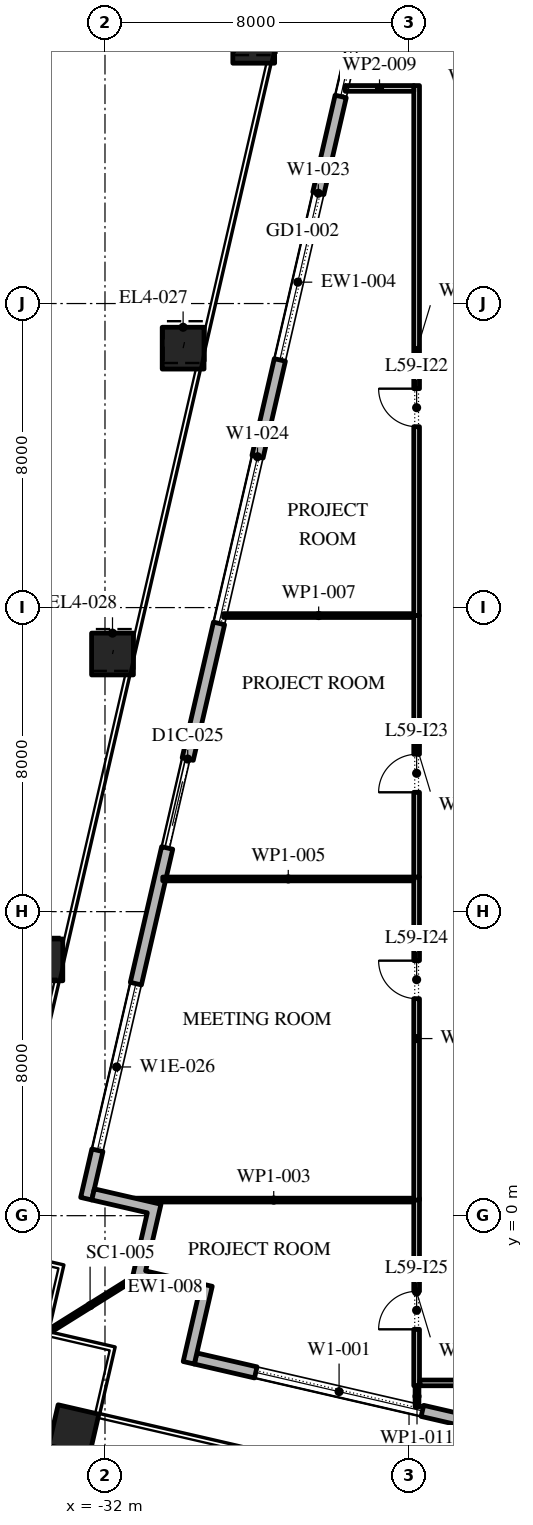
"""IFC4 building model, lengths in metres.
Left out: names, types, materials, properties, quantities, classifications, styles, units other than length and angle.
Written with IfcOpenShell. Run it as: python <this file> out.ifc"""

import sys

from ifc_helpers import new_model, si_unit, direction, frame, frame_2d, origin, origin_2d, place, context, subcontext, project, spatial, polyline, rectangle, outline, extrude, element, fill, save


model = new_model("IFC4")
c1 = context("Model", 3, precision=1e-05, world=origin(), true_north=direction((0.0, 1.0)))
c2 = subcontext(c1, "Body", "Model", "MODEL_VIEW")
j1 = project(units=[si_unit("LENGTHUNIT", "METRE"), si_unit("PLANEANGLEUNIT", "RADIAN")], contexts=[c1])
p1 = place(None, origin())
s1 = spatial("IfcSite", under=j1, at=p1, CompositionType="ELEMENT")
p2 = place(p1, origin())
s2 = spatial("IfcBuilding", under=s1, at=p2, CompositionType="ELEMENT")
p3 = place(p2, frame((0.0, 0.0, 272.4)))
s3 = spatial("IfcBuildingStorey", under=s2, at=p3, CompositionType="ELEMENT", Elevation=272.4)
p4 = place(p3, frame((-32.821, -5.635, 0.0), z_axis=(0.0, 0.0, 1.0), x_axis=(0.974370064785, -0.224951054344, 0.0)))
e1 = element("IfcColumn", 1, at=p4, inside=s3, PredefinedType="COLUMN", context=c2, shape_type="SweptSolid", body=[
    extrude(rectangle(XDim=1.1, YDim=1.1, at=origin_2d()), origin(), (0.0, 0.0, 1.0), 4.2),
])
p5 = place(p3, frame((-28.086, 30.874, 0.0), z_axis=(0.011667590749, 0.050559559912, 0.998652891764), x_axis=(-0.974391195695, 0.224859506699, 0.0)))
e2 = element("IfcColumn", 2, at=p5, inside=s3, PredefinedType="COLUMN", context=c2, shape_type="SweptSolid", body=[
    extrude(rectangle(XDim=1.1, YDim=1.1, at=origin_2d()), origin(), (0.0, 0.0, 1.0), 4.206),
])
p6 = place(p3, frame((-29.944, 22.826, 0.0), z_axis=(0.008770375651, 0.037927518544, 0.999242004646), x_axis=(-0.974290512438, 0.225295355862, 0.0)))
e3 = element("IfcColumn", 3, at=p6, inside=s3, PredefinedType="COLUMN", context=c2, shape_type="SweptSolid", body=[
    extrude(rectangle(XDim=1.1, YDim=1.1, at=origin_2d()), origin(), (0.0, 0.0, 1.0), 4.203),
])
p7 = place(p3, frame((-31.802, 14.778, 0.0), z_axis=(0.005810637908, 0.02533438128, 0.999662145733), x_axis=(-0.974691740237, 0.22355315143, 0.0)))
e4 = element("IfcColumn", 4, at=p7, inside=s3, PredefinedType="COLUMN", context=c2, shape_type="SweptSolid", body=[
    extrude(rectangle(XDim=1.1, YDim=1.1, at=origin_2d()), origin(), (0.0, 0.0, 1.0), 4.202),
])
p8 = place(p3, frame((-33.66, 6.73, 0.0), z_axis=(0.00290605529, 0.012670401066, 0.99991550432), x_axis=(-0.974691740237, 0.22355315143, 0.0)))
e5 = element("IfcColumn", 5, at=p8, inside=s3, PredefinedType="COLUMN", context=c2, shape_type="SweptSolid", body=[
    extrude(rectangle(XDim=1.1, YDim=1.1, at=origin_2d()), origin(), (0.0, 0.0, 1.0), 4.2),
])
p9 = place(p3, frame((-29.616, -3.758, 0.0), z_axis=(0.0, 0.0, 1.0), x_axis=(0.974370532314, -0.224949029246, 0.0)))
e6 = element("IfcWall", 6, at=p9, inside=s3, PredefinedType="STANDARD", context=c2, shape_type="SweptSolid", body=[
    extrude(rectangle(XDim=48.0, YDim=0.3, at=frame_2d((24.0, 0.0))), origin(), (0.0, 0.0, 1.0), 4.0),
])
p10 = place(p9, frame((1.625, 0.0, 0.45)))
e7 = element("IfcOpeningElement", 7, at=p10, cuts=e6, PredefinedType="OPENING", context=c2, shape_type="SweptSolid", body=[
    extrude(rectangle(XDim=4.5, YDim=3.05, at=frame_2d((2.25, 1.525))), frame((0.0, 0.16, 0.0), z_axis=(0.0, -1.0, 0.0), x_axis=(1.0, 0.0, 0.0)), (0.0, 0.0, 1.0), 0.32),
])
p11 = place(p9, frame((10.575, 0.0, 0.0)))
e8 = element("IfcOpeningElement", 8, at=p11, cuts=e6, PredefinedType="OPENING", context=c2, shape_type="SweptSolid", body=[
    extrude(rectangle(XDim=2.4, YDim=3.5, at=frame_2d((1.2, 1.75))), frame((0.0, 0.16, 0.0), z_axis=(0.0, -1.0, 0.0), x_axis=(1.0, 0.0, 0.0)), (0.0, 0.0, 1.0), 0.32),
])
p12 = place(p9, frame((17.575, 0.0, 0.45)))
e9 = element("IfcOpeningElement", 9, at=p12, cuts=e6, PredefinedType="OPENING", context=c2, shape_type="SweptSolid", body=[
    extrude(rectangle(XDim=4.5, YDim=3.0, at=frame_2d((2.25, 1.5))), frame((0.0, 0.16, 0.0), z_axis=(0.0, -1.0, 0.0), x_axis=(1.0, 0.0, 0.0)), (0.0, 0.0, 1.0), 0.32),
])
p13 = place(p9, frame((25.625, 0.0, 0.45)))
e10 = element("IfcOpeningElement", 10, at=p13, cuts=e6, PredefinedType="OPENING", context=c2, shape_type="SweptSolid", body=[
    extrude(rectangle(XDim=4.5, YDim=2.95, at=frame_2d((2.25, 1.475))), frame((0.0, 0.16, 0.0), z_axis=(0.0, -1.0, 0.0), x_axis=(1.0, 0.0, 0.0)), (0.0, 0.0, 1.0), 0.32),
])
p14 = place(p9, frame((33.675, 0.0, 0.45)))
e11 = element("IfcOpeningElement", 11, at=p14, cuts=e6, PredefinedType="OPENING", context=c2, shape_type="SweptSolid", body=[
    extrude(rectangle(XDim=4.5, YDim=2.825, at=frame_2d((2.25, 1.413))), frame((0.0, 0.16, 0.0), z_axis=(0.0, -1.0, 0.0), x_axis=(1.0, 0.0, 0.0)), (0.0, 0.0, 1.0), 0.32),
])
p15 = place(p9, frame((42.175, 0.0, 0.0)))
e12 = element("IfcOpeningElement", 12, at=p15, cuts=e6, PredefinedType="OPENING", context=c2, shape_type="SweptSolid", body=[
    extrude(rectangle(XDim=2.4, YDim=3.5, at=frame_2d((1.2, 1.75))), frame((0.0, 0.16, 0.0), z_axis=(0.0, -1.0, 0.0), x_axis=(1.0, 0.0, 0.0)), (0.0, 0.0, 1.0), 0.32),
])
p16 = place(p3, frame((-21.359, 48.678, 0.0), z_axis=(0.0, 0.0, 1.0), x_axis=(-0.224949198343, -0.974370493275, 0.0)))
e13 = element("IfcWall", 13, at=p16, inside=s3, PredefinedType="STANDARD", context=c2, shape_type="SweptSolid", body=[
    extrude(rectangle(XDim=49.5, YDim=0.3, at=frame_2d((24.75, 0.0))), origin(), (0.0, 0.0, 1.0), 4.0),
])
p17 = place(p16, frame((1.157, 0.0, 0.45)))
e14 = element("IfcOpeningElement", 14, at=p17, cuts=e13, PredefinedType="OPENING", context=c2, shape_type="SweptSolid", body=[
    extrude(rectangle(XDim=4.5, YDim=3.05, at=frame_2d((2.25, 1.525))), frame((0.0, 0.16, 0.0), z_axis=(0.0, -1.0, 0.0), x_axis=(1.0, 0.0, 0.0)), (0.0, 0.0, 1.0), 0.32),
])
p18 = place(p16, frame((9.171, 0.0, 0.0)))
e15 = element("IfcOpeningElement", 15, at=p18, cuts=e13, PredefinedType="OPENING", context=c2, shape_type="SweptSolid", body=[
    extrude(rectangle(XDim=2.4, YDim=3.5, at=frame_2d((1.2, 1.75))), frame((0.0, 0.16, 0.0), z_axis=(0.0, -1.0, 0.0), x_axis=(1.0, 0.0, 0.0)), (0.0, 0.0, 1.0), 0.32),
])
p19 = place(p16, frame((15.236, 0.0, 0.45)))
e16 = element("IfcOpeningElement", 16, at=p19, cuts=e13, PredefinedType="OPENING", context=c2, shape_type="SweptSolid", body=[
    extrude(rectangle(XDim=4.5, YDim=3.05, at=frame_2d((2.25, 1.525))), frame((0.0, 0.16, 0.0), z_axis=(0.0, -1.0, 0.0), x_axis=(1.0, 0.0, 0.0)), (0.0, 0.0, 1.0), 0.32),
])
p20 = place(p16, frame((22.35, 0.0, 0.45)))
e17 = element("IfcOpeningElement", 17, at=p20, cuts=e13, PredefinedType="OPENING", context=c2, shape_type="SweptSolid", body=[
    extrude(rectangle(XDim=4.5, YDim=3.05, at=frame_2d((2.25, 1.525))), frame((0.0, 0.16, 0.0), z_axis=(0.0, -1.0, 0.0), x_axis=(1.0, 0.0, 0.0)), (0.0, 0.0, 1.0), 0.32),
])
p21 = place(p16, frame((29.464, 0.0, 0.45)))
e18 = element("IfcOpeningElement", 18, at=p21, cuts=e13, PredefinedType="OPENING", context=c2, shape_type="SweptSolid", body=[
    extrude(rectangle(XDim=4.5, YDim=3.05, at=frame_2d((2.25, 1.525))), frame((0.0, 0.16, 0.0), z_axis=(0.0, -1.0, 0.0), x_axis=(1.0, 0.0, 0.0)), (0.0, 0.0, 1.0), 0.32),
])
p22 = place(p16, frame((37.628, 0.0, 0.0)))
e19 = element("IfcOpeningElement", 19, at=p22, cuts=e13, PredefinedType="OPENING", context=c2, shape_type="SweptSolid", body=[
    extrude(rectangle(XDim=2.4, YDim=3.325, at=frame_2d((1.2, 1.663))), frame((0.0, 0.16, 0.0), z_axis=(0.0, -1.0, 0.0), x_axis=(1.0, 0.0, 0.0)), (0.0, 0.0, 1.0), 0.32),
])
p23 = place(p16, frame((43.693, 0.0, 0.45)))
e20 = element("IfcOpeningElement", 20, at=p23, cuts=e13, PredefinedType="OPENING", context=c2, shape_type="SweptSolid", body=[
    extrude(rectangle(XDim=4.5, YDim=2.825, at=frame_2d((2.25, 1.413))), frame((0.0, 0.16, 0.0), z_axis=(0.0, -1.0, 0.0), x_axis=(1.0, 0.0, 0.0)), (0.0, 0.0, 1.0), 0.32),
])
p24 = place(p3, origin())
e21 = element("IfcWall", 21, at=p24, inside=s3, PredefinedType="STANDARD", context=c2, shape_type="SweptSolid", body=[
    extrude(outline(polyline([(-31.291, -1.678), (-30.886, 0.076), (-32.348, 0.413), (-32.28, 0.705), (-30.526, 0.301), (-30.931, -1.453), (-29.177, -1.858), (-29.65, -3.905), (-29.942, -3.837), (-29.537, -2.083), (-31.291, -1.678)])), origin(), (0.0, 0.0, 1.0), 4.0),
])
p25 = place(p3, frame((-31.291, -1.678, -0.05), z_axis=(0.0, 0.0, 1.0), x_axis=(-0.84807753525, -0.529872148923, 0.0)))
e22 = element("IfcWall", 22, at=p25, inside=s3, PredefinedType="STANDARD", context=c2, shape_type="SweptSolid", body=[
    extrude(rectangle(XDim=2.596, YDim=0.1, at=frame_2d((1.298, 0.0))), origin(), (0.0, 0.0, 1.0), 4.05),
])
p26 = place(p3, frame((-23.8, -4.475, 0.0), z_axis=(0.0, 0.0, 1.0), x_axis=(0.0, 1.0, 0.0)))
e23 = element("IfcWall", 23, at=p26, inside=s3, PredefinedType="PARTITIONING", context=c2, shape_type="SweptSolid", body=[
    extrude(rectangle(XDim=4.935, YDim=0.15, at=frame_2d((2.468, 0.0))), origin(), (0.0, 0.0, 1.0), 4.0),
])
p27 = place(p26, frame((1.485, 0.0, 0.0)))
e24 = element("IfcOpeningElement", 24, at=p27, cuts=e23, PredefinedType="OPENING", context=c2, shape_type="SweptSolid", body=[
    extrude(rectangle(XDim=1.0, YDim=2.1, at=frame_2d((0.5, 1.05))), frame((0.0, 0.085, 0.0), z_axis=(0.0, -1.0, 0.0), x_axis=(1.0, 0.0, 0.0)), (0.0, 0.0, 1.0), 0.17),
])
p28 = place(p3, frame((-23.875, 0.41, 0.0), z_axis=(0.0, 0.0, 1.0), x_axis=(-1.0, 0.0, 0.0)))
e25 = element("IfcWall", 25, at=p28, inside=s3, PredefinedType="PARTITIONING", context=c2, shape_type="SweptSolid", body=[
    extrude(rectangle(XDim=7.37, YDim=0.1, at=frame_2d((3.685, 0.0))), origin(), (0.0, 0.0, 1.0), 4.0),
])
p29 = place(p3, frame((-23.8, 0.41, 0.0), z_axis=(0.0, 0.0, 1.0), x_axis=(0.0, 1.0, 0.0)))
e26 = element("IfcWall", 26, at=p29, inside=s3, PredefinedType="PARTITIONING", context=c2, shape_type="SweptSolid", body=[
    extrude(rectangle(XDim=8.5, YDim=0.15, at=frame_2d((4.25, 0.0))), origin(), (0.0, 0.0, 1.0), 4.0),
])
p30 = place(p29, frame((5.3, 0.0, 0.0)))
e27 = element("IfcOpeningElement", 27, at=p30, cuts=e26, PredefinedType="OPENING", context=c2, shape_type="SweptSolid", body=[
    extrude(rectangle(XDim=1.0, YDim=2.1, at=frame_2d((0.5, 1.05))), frame((0.0, 0.085, 0.0), z_axis=(0.0, -1.0, 0.0), x_axis=(1.0, 0.0, 0.0)), (0.0, 0.0, 1.0), 0.17),
])
p31 = place(p3, frame((-23.875, 8.86, 0.0), z_axis=(0.0, 0.0, 1.0), x_axis=(-1.0, 0.0, 0.0)))
e28 = element("IfcWall", 28, at=p31, inside=s3, PredefinedType="PARTITIONING", context=c2, shape_type="SweptSolid", body=[
    extrude(rectangle(XDim=6.605, YDim=0.1, at=frame_2d((3.302, 0.0))), origin(), (0.0, 0.0, 1.0), 4.0),
])
p32 = place(p3, frame((-23.8, 8.91, 0.0), z_axis=(0.0, 0.0, 1.0), x_axis=(0.0, 1.0, 0.0)))
e29 = element("IfcWall", 29, at=p32, inside=s3, PredefinedType="PARTITIONING", context=c2, shape_type="SweptSolid", body=[
    extrude(rectangle(XDim=6.88, YDim=0.15, at=frame_2d((3.44, 0.0))), origin(), (0.0, 0.0, 1.0), 4.0),
])
p33 = place(p32, frame((2.23, 0.0, 0.0)))
e30 = element("IfcOpeningElement", 30, at=p33, cuts=e29, PredefinedType="OPENING", context=c2, shape_type="SweptSolid", body=[
    extrude(rectangle(XDim=1.0, YDim=2.1, at=frame_2d((0.5, 1.05))), frame((0.0, 0.085, 0.0), z_axis=(0.0, -1.0, 0.0), x_axis=(1.0, 0.0, 0.0)), (0.0, 0.0, 1.0), 0.17),
])
p34 = place(p3, frame((-23.875, 15.79, 0.0), z_axis=(0.0, 0.0, 1.0), x_axis=(-1.0, 0.0, 0.0)))
e31 = element("IfcWall", 31, at=p34, inside=s3, PredefinedType="PARTITIONING", context=c2, shape_type="SweptSolid", body=[
    extrude(rectangle(XDim=5.005, YDim=0.1, at=frame_2d((2.502, 0.0))), origin(), (0.0, 0.0, 1.0), 4.0),
])
p35 = place(p3, frame((-23.8, 15.79, 0.0), z_axis=(0.0, 0.0, 1.0), x_axis=(0.0, 1.0, 0.0)))
e32 = element("IfcWall", 32, at=p35, inside=s3, PredefinedType="PARTITIONING", context=c2, shape_type="SweptSolid", body=[
    extrude(rectangle(XDim=13.945, YDim=0.15, at=frame_2d((6.973, 0.0))), origin(), (0.0, 0.0, 1.0), 4.0),
])
p36 = place(p35, frame((4.97, 0.0, 0.0)))
e33 = element("IfcOpeningElement", 33, at=p36, cuts=e32, PredefinedType="OPENING", context=c2, shape_type="SweptSolid", body=[
    extrude(rectangle(XDim=1.0, YDim=2.1, at=frame_2d((0.5, 1.05))), frame((0.0, 0.085, 0.0), z_axis=(0.0, -1.0, 0.0), x_axis=(1.0, 0.0, 0.0)), (0.0, 0.0, 1.0), 0.17),
])
p37 = place(p3, frame((-23.875, 29.66, 0.0), z_axis=(0.0, 0.0, 1.0), x_axis=(-1.0, 0.0, 0.0)))
e34 = element("IfcWall", 34, at=p37, inside=s3, PredefinedType="PARTITIONING", context=c2, shape_type="SweptSolid", body=[
    extrude(rectangle(XDim=1.803, YDim=0.15, at=frame_2d((0.901, 0.0))), origin(), (0.0, 0.0, 1.0), 4.0),
])
p38 = place(p3, frame((-23.79, -5.032, 0.0), z_axis=(0.0, 0.0, 1.0), x_axis=(0.0, 1.0, 0.0)))
e35 = element("IfcWall", 35, at=p38, inside=s3, PredefinedType="PARTITIONING", context=c2, shape_type="SweptSolid", body=[
    extrude(rectangle(XDim=0.557, YDim=0.1, at=frame_2d((0.278, 0.0))), origin(), (0.0, 0.0, 1.0), 4.0),
])
p39 = place(p3, frame((-10.075, -4.4, 0.0), z_axis=(0.0, 0.0, 1.0), x_axis=(-1.0, 0.0, 0.0)))
e36 = element("IfcWall", 36, at=p39, inside=s3, PredefinedType="PARTITIONING", context=c2, shape_type="SweptSolid", body=[
    extrude(rectangle(XDim=13.64, YDim=0.15, at=frame_2d((6.82, 0.0))), origin(), (0.0, 0.0, 1.0), 4.0),
])
p40 = place(p39, frame((9.065, 0.0, 0.0)))
e37 = element("IfcOpeningElement", 37, at=p40, cuts=e36, PredefinedType="OPENING", context=c2, shape_type="SweptSolid", body=[
    extrude(rectangle(XDim=1.0, YDim=2.1, at=frame_2d((0.5, 1.05))), frame((0.0, 0.085, 0.0), z_axis=(0.0, -1.0, 0.0), x_axis=(1.0, 0.0, 0.0)), (0.0, 0.0, 1.0), 0.17),
])
p41 = place(p10, origin())
e38 = element("IfcWindow", 38, at=p41, inside=s3, PartitioningType="DOUBLE_PANEL_VERTICAL", PredefinedType="WINDOW", context=c2, shape_type="SweptSolid", body=[
    extrude(rectangle(XDim=4.5, YDim=3.05, at=frame_2d((2.25, 1.525))), frame((0.0, 0.03, 0.0), z_axis=(0.0, -1.0, 0.0), x_axis=(1.0, 0.0, 0.0)), (0.0, 0.0, 1.0), 0.06),
])
fill(e7, e38)
p42 = place(p19, origin())
e39 = element("IfcWindow", 39, at=p42, inside=s3, PartitioningType="DOUBLE_PANEL_VERTICAL", PredefinedType="WINDOW", context=c2, shape_type="SweptSolid", body=[
    extrude(rectangle(XDim=4.5, YDim=3.05, at=frame_2d((2.25, 1.525))), frame((0.0, 0.03, 0.0), z_axis=(0.0, -1.0, 0.0), x_axis=(1.0, 0.0, 0.0)), (0.0, 0.0, 1.0), 0.06),
])
fill(e16, e39)
p43 = place(p20, origin())
e40 = element("IfcWindow", 40, at=p43, inside=s3, PartitioningType="DOUBLE_PANEL_VERTICAL", PredefinedType="WINDOW", context=c2, shape_type="SweptSolid", body=[
    extrude(rectangle(XDim=4.5, YDim=3.05, at=frame_2d((2.25, 1.525))), frame((0.0, 0.03, 0.0), z_axis=(0.0, -1.0, 0.0), x_axis=(1.0, 0.0, 0.0)), (0.0, 0.0, 1.0), 0.06),
])
fill(e17, e40)
p44 = place(p21, origin())
e41 = element("IfcWindow", 41, at=p44, inside=s3, PartitioningType="DOUBLE_PANEL_VERTICAL", PredefinedType="WINDOW", context=c2, shape_type="SweptSolid", body=[
    extrude(rectangle(XDim=4.5, YDim=3.05, at=frame_2d((2.25, 1.525))), frame((0.0, 0.03, 0.0), z_axis=(0.0, -1.0, 0.0), x_axis=(1.0, 0.0, 0.0)), (0.0, 0.0, 1.0), 0.06),
])
fill(e18, e41)
p45 = place(p22, origin())
e42 = element("IfcDoor", 42, at=p45, inside=s3, OperationType="DOUBLE_DOOR_SLIDING", PredefinedType="DOOR", context=c2, shape_type="SweptSolid", body=[
    extrude(rectangle(XDim=2.4, YDim=3.325, at=frame_2d((1.2, 1.663))), frame((0.0, 0.025, 0.0), z_axis=(0.0, -1.0, 0.0), x_axis=(1.0, 0.0, 0.0)), (0.0, 0.0, 1.0), 0.05),
])
fill(e19, e42)
p46 = place(p23, origin())
e43 = element("IfcWindow", 43, at=p46, inside=s3, PartitioningType="DOUBLE_PANEL_VERTICAL", PredefinedType="WINDOW", context=c2, shape_type="SweptSolid", body=[
    extrude(rectangle(XDim=4.5, YDim=2.825, at=frame_2d((2.25, 1.413))), frame((0.0, 0.03, 0.0), z_axis=(0.0, -1.0, 0.0), x_axis=(1.0, 0.0, 0.0)), (0.0, 0.0, 1.0), 0.06),
])
fill(e20, e43)
p47 = place(p36, origin())
e44 = element("IfcDoor", 44, at=p47, inside=s3, OperationType="SINGLE_SWING_LEFT", PredefinedType="DOOR", context=c2, shape_type="SweptSolid", body=[
    extrude(rectangle(XDim=1.0, YDim=2.1, at=frame_2d((0.5, 1.05))), frame((0.0, 0.025, 0.0), z_axis=(0.0, -1.0, 0.0), x_axis=(1.0, 0.0, 0.0)), (0.0, 0.0, 1.0), 0.05),
])
fill(e33, e44)
p48 = place(p33, origin())
e45 = element("IfcDoor", 45, at=p48, inside=s3, OperationType="SINGLE_SWING_RIGHT", PredefinedType="DOOR", context=c2, shape_type="SweptSolid", body=[
    extrude(rectangle(XDim=1.0, YDim=2.1, at=frame_2d((0.5, 1.05))), frame((0.0, 0.025, 0.0), z_axis=(0.0, -1.0, 0.0), x_axis=(1.0, 0.0, 0.0)), (0.0, 0.0, 1.0), 0.05),
])
fill(e30, e45)
p49 = place(p30, origin())
e46 = element("IfcDoor", 46, at=p49, inside=s3, OperationType="SINGLE_SWING_LEFT", PredefinedType="DOOR", context=c2, shape_type="SweptSolid", body=[
    extrude(rectangle(XDim=1.0, YDim=2.1, at=frame_2d((0.5, 1.05))), frame((0.0, 0.025, 0.0), z_axis=(0.0, -1.0, 0.0), x_axis=(1.0, 0.0, 0.0)), (0.0, 0.0, 1.0), 0.05),
])
fill(e27, e46)
p50 = place(p27, origin())
e47 = element("IfcDoor", 47, at=p50, inside=s3, OperationType="SINGLE_SWING_RIGHT", PredefinedType="DOOR", context=c2, shape_type="SweptSolid", body=[
    extrude(rectangle(XDim=1.0, YDim=2.1, at=frame_2d((0.5, 1.05))), frame((0.0, 0.025, 0.0), z_axis=(0.0, -1.0, 0.0), x_axis=(1.0, 0.0, 0.0)), (0.0, 0.0, 1.0), 0.05),
])
fill(e24, e47)
save(model, sys.argv[1])
